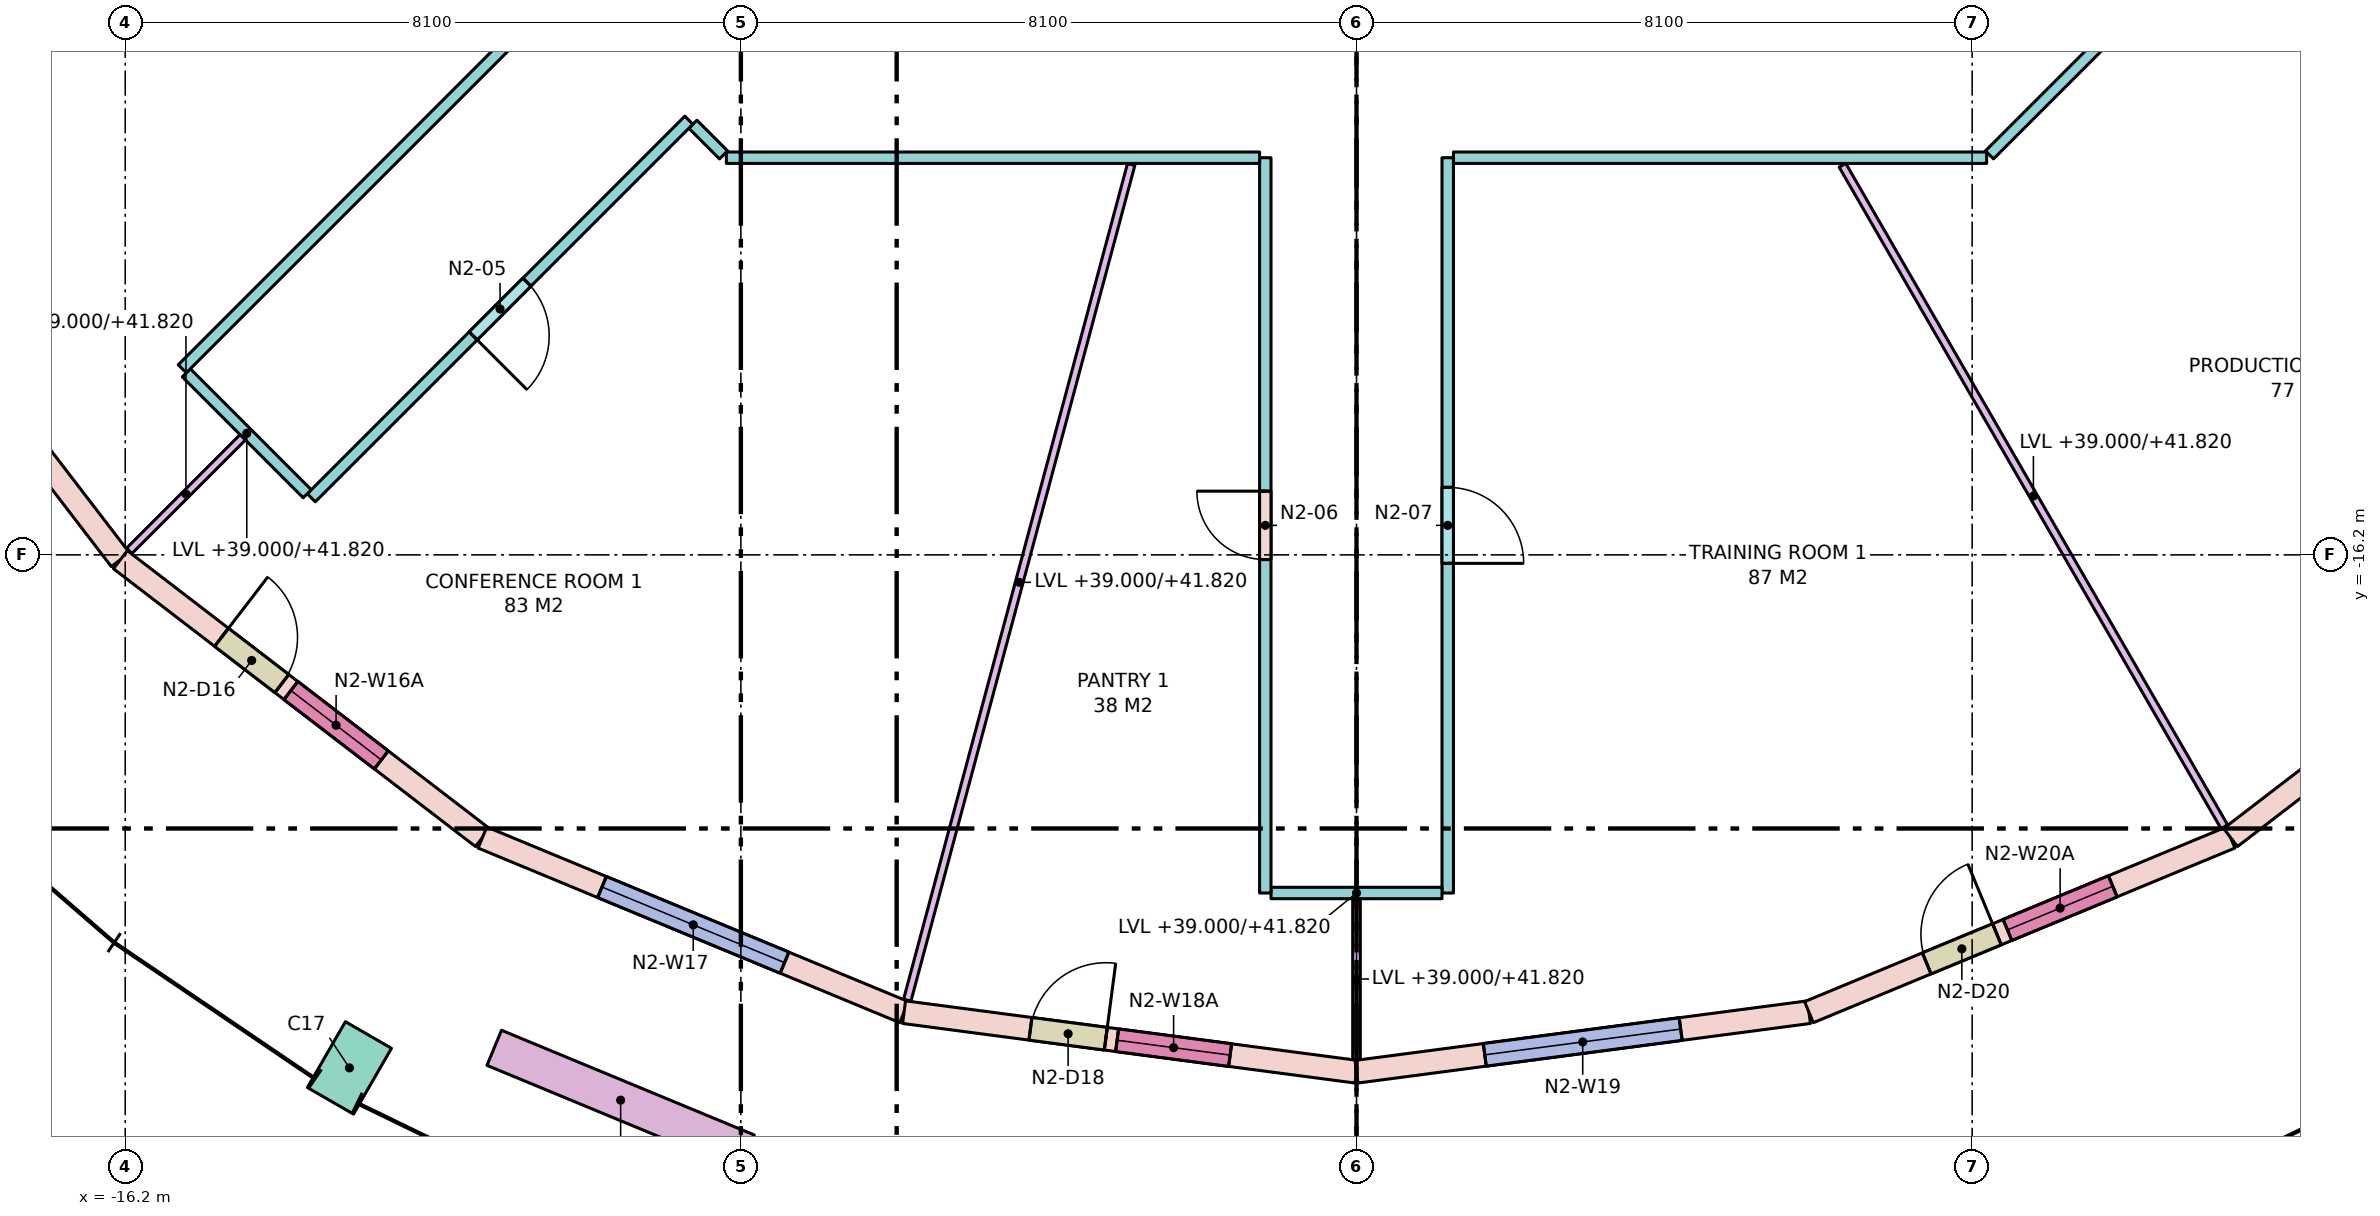
"""IFC4 building model, lengths in metres.
Left out: names, types, materials, properties, quantities, classifications, styles, units other than length and angle.
Written with IfcOpenShell. Run it as: python <this file> out.ifc"""

import sys

from ifc_helpers import new_model, si_unit, direction, frame, frame_2d, origin, origin_2d, place, context, subcontext, project, spatial, rectangle, extrude, element, fill, save


model = new_model("IFC4")
c1 = context("Model", 3, precision=1e-05, world=origin(), true_north=direction((0.0, 1.0)))
c2 = subcontext(c1, "Body", "Model", "MODEL_VIEW")
j1 = project(units=[si_unit("LENGTHUNIT", "METRE"), si_unit("PLANEANGLEUNIT", "RADIAN")], contexts=[c1])
p1 = place(None, origin())
s1 = spatial("IfcSite", under=j1, at=p1, CompositionType="ELEMENT")
p2 = place(p1, origin())
s2 = spatial("IfcBuilding", under=s1, at=p2, CompositionType="ELEMENT")
p3 = place(p2, frame((0.0, 0.0, 39.0)))
s3 = spatial("IfcBuildingStorey", under=s2, at=p3, CompositionType="ELEMENT", Elevation=39.0)
p4 = place(p3, frame((-13.25, -22.95, 0.0), z_axis=(0.0, 0.0, 1.0), x_axis=(0.866025403784, -0.5, 0.0)))
e1 = element("IfcColumn", 1, at=p4, inside=s3, PredefinedType="COLUMN", context=c2, shape_type="SweptSolid", body=[
    extrude(rectangle(XDim=0.7, YDim=1.0, at=origin_2d()), origin(), (0.0, 0.0, 1.0), 4.0),
])
p5 = place(p3, frame((-19.919, -11.5, 0.0), z_axis=(0.0, 0.0, 1.0), x_axis=(0.608778912074, -0.793339924758, 0.0)))
e2 = element("IfcWall", 2, at=p5, inside=s3, PredefinedType="STANDARD", context=c2, shape_type="SweptSolid", body=[
    extrude(rectangle(XDim=6.004, YDim=0.3, at=frame_2d((3.002, 0.0))), origin(), (0.0, 0.0, 1.0), 3.72),
])
p6 = place(p5, frame((1.702, 0.0, 0.8)))
e3 = element("IfcOpeningElement", 3, at=p6, cuts=e2, PredefinedType="OPENING", context=c2, shape_type="SweptSolid", body=[
    extrude(rectangle(XDim=2.6, YDim=2.7, at=frame_2d((1.3, 1.35))), frame((0.0, 0.16, 0.0), z_axis=(0.0, -1.0, 0.0), x_axis=(1.0, 0.0, 0.0)), (0.0, 0.0, 1.0), 0.32),
])
p7 = place(p3, frame((-16.263, -16.263, 0.0), z_axis=(0.0, 0.0, 1.0), x_axis=(0.793339924758, -0.608778912074, 0.0)))
e4 = element("IfcWall", 4, at=p7, inside=s3, PredefinedType="STANDARD", context=c2, shape_type="SweptSolid", body=[
    extrude(rectangle(XDim=6.004, YDim=0.3, at=frame_2d((3.002, 0.0))), origin(), (0.0, 0.0, 1.0), 3.72),
])
p8 = place(p7, frame((1.677, 0.0, 0.0)))
e5 = element("IfcOpeningElement", 5, at=p8, cuts=e4, PredefinedType="OPENING", context=c2, shape_type="SweptSolid", body=[
    extrude(rectangle(XDim=1.0, YDim=2.4, at=frame_2d((0.5, 1.2))), frame((0.0, 0.16, 0.0), z_axis=(0.0, -1.0, 0.0), x_axis=(1.0, 0.0, 0.0)), (0.0, 0.0, 1.0), 0.32),
])
p9 = place(p7, frame((2.827, 0.0, 0.8)))
e6 = element("IfcOpeningElement", 6, at=p9, cuts=e4, PredefinedType="OPENING", context=c2, shape_type="SweptSolid", body=[
    extrude(rectangle(XDim=1.5, YDim=2.7, at=frame_2d((0.75, 1.35))), frame((0.0, 0.16, 0.0), z_axis=(0.0, -1.0, 0.0), x_axis=(1.0, 0.0, 0.0)), (0.0, 0.0, 1.0), 0.32),
])
p10 = place(p3, frame((-11.5, -19.919, 0.0), z_axis=(0.0, 0.0, 1.0), x_axis=(0.923884511653, -0.382671411433, 0.0)))
e7 = element("IfcWall", 7, at=p10, inside=s3, PredefinedType="STANDARD", context=c2, shape_type="SweptSolid", body=[
    extrude(rectangle(XDim=6.004, YDim=0.3, at=frame_2d((3.002, 0.0))), origin(), (0.0, 0.0, 1.0), 3.72),
])
p11 = place(p10, frame((1.702, 0.0, 0.8)))
e8 = element("IfcOpeningElement", 8, at=p11, cuts=e7, PredefinedType="OPENING", context=c2, shape_type="SweptSolid", body=[
    extrude(rectangle(XDim=2.6, YDim=2.7, at=frame_2d((1.3, 1.35))), frame((0.0, 0.16, 0.0), z_axis=(0.0, -1.0, 0.0), x_axis=(1.0, 0.0, 0.0)), (0.0, 0.0, 1.0), 0.32),
])
p12 = place(p3, frame((-5.953, -22.216, 0.0), z_axis=(0.0, 0.0, 1.0), x_axis=(0.991445297315, -0.130522880875, 0.0)))
e9 = element("IfcWall", 9, at=p12, inside=s3, PredefinedType="STANDARD", context=c2, shape_type="SweptSolid", body=[
    extrude(rectangle(XDim=6.004, YDim=0.3, at=frame_2d((3.002, 0.0))), origin(), (0.0, 0.0, 1.0), 3.72),
])
p13 = place(p12, frame((1.677, 0.0, 0.0)))
e10 = element("IfcOpeningElement", 10, at=p13, cuts=e9, PredefinedType="OPENING", context=c2, shape_type="SweptSolid", body=[
    extrude(rectangle(XDim=1.0, YDim=2.4, at=frame_2d((0.5, 1.2))), frame((0.0, 0.16, 0.0), z_axis=(0.0, -1.0, 0.0), x_axis=(1.0, 0.0, 0.0)), (0.0, 0.0, 1.0), 0.32),
])
p14 = place(p12, frame((2.827, 0.0, 0.8)))
e11 = element("IfcOpeningElement", 11, at=p14, cuts=e9, PredefinedType="OPENING", context=c2, shape_type="SweptSolid", body=[
    extrude(rectangle(XDim=1.5, YDim=2.7, at=frame_2d((0.75, 1.35))), frame((0.0, 0.16, 0.0), z_axis=(0.0, -1.0, 0.0), x_axis=(1.0, 0.0, 0.0)), (0.0, 0.0, 1.0), 0.32),
])
p15 = place(p3, frame((0.0, -23.0, 0.0), z_axis=(0.0, 0.0, 1.0), x_axis=(0.991445297315, 0.130522880875, 0.0)))
e12 = element("IfcWall", 12, at=p15, inside=s3, PredefinedType="STANDARD", context=c2, shape_type="SweptSolid", body=[
    extrude(rectangle(XDim=6.004, YDim=0.3, at=frame_2d((3.002, 0.0))), origin(), (0.0, 0.0, 1.0), 3.72),
])
p16 = place(p15, frame((1.702, 0.0, 0.8)))
e13 = element("IfcOpeningElement", 13, at=p16, cuts=e12, PredefinedType="OPENING", context=c2, shape_type="SweptSolid", body=[
    extrude(rectangle(XDim=2.6, YDim=2.7, at=frame_2d((1.3, 1.35))), frame((0.0, 0.16, 0.0), z_axis=(0.0, -1.0, 0.0), x_axis=(1.0, 0.0, 0.0)), (0.0, 0.0, 1.0), 0.32),
])
p17 = place(p3, frame((5.953, -22.216, 0.0), z_axis=(0.0, 0.0, 1.0), x_axis=(0.923884511653, 0.382671411433, 0.0)))
e14 = element("IfcWall", 14, at=p17, inside=s3, PredefinedType="STANDARD", context=c2, shape_type="SweptSolid", body=[
    extrude(rectangle(XDim=6.004, YDim=0.3, at=frame_2d((3.002, 0.0))), origin(), (0.0, 0.0, 1.0), 3.72),
])
p18 = place(p17, frame((1.677, 0.0, 0.0)))
e15 = element("IfcOpeningElement", 15, at=p18, cuts=e14, PredefinedType="OPENING", context=c2, shape_type="SweptSolid", body=[
    extrude(rectangle(XDim=1.0, YDim=2.4, at=frame_2d((0.5, 1.2))), frame((0.0, 0.16, 0.0), z_axis=(0.0, -1.0, 0.0), x_axis=(1.0, 0.0, 0.0)), (0.0, 0.0, 1.0), 0.32),
])
p19 = place(p17, frame((2.827, 0.0, 0.8)))
e16 = element("IfcOpeningElement", 16, at=p19, cuts=e14, PredefinedType="OPENING", context=c2, shape_type="SweptSolid", body=[
    extrude(rectangle(XDim=1.5, YDim=2.7, at=frame_2d((0.75, 1.35))), frame((0.0, 0.16, 0.0), z_axis=(0.0, -1.0, 0.0), x_axis=(1.0, 0.0, 0.0)), (0.0, 0.0, 1.0), 0.32),
])
p20 = place(p3, frame((11.5, -19.919, 0.0), z_axis=(0.0, 0.0, 1.0), x_axis=(0.793339924758, 0.608778912074, 0.0)))
e17 = element("IfcWall", 17, at=p20, inside=s3, PredefinedType="STANDARD", context=c2, shape_type="SweptSolid", body=[
    extrude(rectangle(XDim=6.004, YDim=0.3, at=frame_2d((3.002, 0.0))), origin(), (0.0, 0.0, 1.0), 3.72),
])
p21 = place(p20, frame((1.702, 0.0, 0.8)))
e18 = element("IfcOpeningElement", 18, at=p21, cuts=e17, PredefinedType="OPENING", context=c2, shape_type="SweptSolid", body=[
    extrude(rectangle(XDim=2.6, YDim=2.7, at=frame_2d((1.3, 1.35))), frame((0.0, 0.16, 0.0), z_axis=(0.0, -1.0, 0.0), x_axis=(1.0, 0.0, 0.0)), (0.0, 0.0, 1.0), 0.32),
])
p22 = place(p3, frame((-11.345, -22.685, 0.0), z_axis=(0.0, 0.0, 1.0), x_axis=(0.923885420167, -0.382669217998, 0.0)))
e19 = element("IfcWall", 19, at=p22, inside=s3, PredefinedType="PARAPET", context=c2, shape_type="SweptSolid", body=[
    extrude(rectangle(XDim=3.6, YDim=0.5, at=frame_2d((1.8, 0.0))), origin(), (0.0, 0.0, 1.0), 0.9),
])
p23 = place(p3, frame((17.282, -11.364, 0.0), z_axis=(0.0, 0.0, 1.0), x_axis=(-0.86603341746, 0.49998611965, 0.0)))
e20 = element("IfcWall", 20, at=p23, inside=s3, PredefinedType="PARTITIONING", context=c2, shape_type="SweptSolid", body=[
    extrude(rectangle(XDim=6.866, YDim=0.15, at=frame_2d((3.433, 0.0))), origin(), (0.0, 0.0, 1.0), 3.72),
])
p24 = place(p23, frame((2.983, 0.0, 0.0)))
e21 = element("IfcOpeningElement", 21, at=p24, cuts=e20, PredefinedType="OPENING", context=c2, shape_type="SweptSolid", body=[
    extrude(rectangle(XDim=0.9, YDim=2.1, at=frame_2d((0.45, 1.05))), frame((0.0, 0.085, 0.0), z_axis=(0.0, -1.0, 0.0), x_axis=(1.0, 0.0, 0.0)), (0.0, 0.0, 1.0), 0.17),
])
p25 = place(p3, frame((11.284, -7.981, 0.0), z_axis=(0.0, 0.0, 1.0), x_axis=(-0.707077584218, -0.707135976949, 0.0)))
e22 = element("IfcWall", 22, at=p25, inside=s3, PredefinedType="PARTITIONING", context=c2, shape_type="SweptSolid", body=[
    extrude(rectangle(XDim=4.181, YDim=0.15, at=frame_2d((2.09, 0.0))), origin(), (0.0, 0.0, 1.0), 2.82),
])
p26 = place(p3, frame((8.291, -10.975, 0.0), z_axis=(0.0, 0.0, 1.0), x_axis=(-1.0, 0.0, 0.0)))
e23 = element("IfcWall", 23, at=p26, inside=s3, PredefinedType="PARTITIONING", context=c2, shape_type="SweptSolid", body=[
    extrude(rectangle(XDim=7.016, YDim=0.15, at=frame_2d((3.508, 0.0))), origin(), (0.0, 0.0, 1.0), 2.82),
])
p27 = place(p3, frame((1.2, -10.975, 0.0), z_axis=(0.0, 0.0, 1.0), x_axis=(0.0, -1.0, 0.0)))
e24 = element("IfcWall", 24, at=p27, inside=s3, PredefinedType="PARTITIONING", context=c2, shape_type="SweptSolid", body=[
    extrude(rectangle(XDim=9.674, YDim=0.15, at=frame_2d((4.837, 0.0))), origin(), (0.0, 0.0, 1.0), 3.72),
])
p28 = place(p27, frame((4.337, 0.0, 0.0)))
e25 = element("IfcOpeningElement", 25, at=p28, cuts=e24, PredefinedType="OPENING", context=c2, shape_type="SweptSolid", body=[
    extrude(rectangle(XDim=1.0, YDim=2.1, at=frame_2d((0.5, 1.05))), frame((0.0, 0.085, 0.0), z_axis=(0.0, -1.0, 0.0), x_axis=(1.0, 0.0, 0.0)), (0.0, 0.0, 1.0), 0.17),
])
p29 = place(p3, frame((1.125, -20.649, 0.0), z_axis=(0.0, 0.0, 1.0), x_axis=(-1.0, 0.0, 0.0)))
e26 = element("IfcWall", 26, at=p29, inside=s3, PredefinedType="PARTITIONING", context=c2, shape_type="SweptSolid", body=[
    extrude(rectangle(XDim=2.25, YDim=0.15, at=frame_2d((1.125, 0.0))), origin(), (0.0, 0.0, 1.0), 2.82),
])
p30 = place(p3, frame((-1.2, -20.649, 0.0), z_axis=(0.0, 0.0, 1.0), x_axis=(0.0, 1.0, 0.0)))
e27 = element("IfcWall", 27, at=p30, inside=s3, PredefinedType="PARTITIONING", context=c2, shape_type="SweptSolid", body=[
    extrude(rectangle(XDim=9.674, YDim=0.15, at=frame_2d((4.837, 0.0))), origin(), (0.0, 0.0, 1.0), 3.72),
])
p31 = place(p30, frame((4.387, 0.0, 0.0)))
e28 = element("IfcOpeningElement", 28, at=p31, cuts=e27, PredefinedType="OPENING", context=c2, shape_type="SweptSolid", body=[
    extrude(rectangle(XDim=0.9, YDim=2.1, at=frame_2d((0.45, 1.05))), frame((0.0, 0.085, 0.0), z_axis=(0.0, -1.0, 0.0), x_axis=(1.0, 0.0, 0.0)), (0.0, 0.0, 1.0), 0.17),
])
p32 = place(p3, frame((-1.275, -10.975, 0.0), z_axis=(0.0, 0.0, 1.0), x_axis=(-1.0, 0.0, 0.0)))
e29 = element("IfcWall", 29, at=p32, inside=s3, PredefinedType="PARTITIONING", context=c2, shape_type="SweptSolid", body=[
    extrude(rectangle(XDim=7.016, YDim=0.15, at=frame_2d((3.508, 0.0))), origin(), (0.0, 0.0, 1.0), 2.82),
])
p33 = place(p3, frame((-8.328, -10.938, 0.0), z_axis=(0.0, 0.0, 1.0), x_axis=(-0.707106781187, 0.707106781187, 0.0)))
e30 = element("IfcWall", 30, at=p33, inside=s3, PredefinedType="PARTITIONING", context=c2, shape_type="SweptSolid", body=[
    extrude(rectangle(XDim=0.571, YDim=0.15, at=frame_2d((0.285, 0.0))), origin(), (0.0, 0.0, 1.0), 3.72),
])
p34 = place(p3, frame((-8.784, -10.481, 0.0), z_axis=(0.0, 0.0, 1.0), x_axis=(-0.707089406061, -0.707124155885, 0.0)))
e31 = element("IfcWall", 31, at=p34, inside=s3, PredefinedType="PARTITIONING", context=c2, shape_type="SweptSolid", body=[
    extrude(rectangle(XDim=7.026, YDim=0.15, at=frame_2d((3.513, 0.0))), origin(), (0.0, 0.0, 1.0), 3.72),
])
p35 = place(p34, frame((3.013, 0.0, 0.0)))
e32 = element("IfcOpeningElement", 32, at=p35, cuts=e31, PredefinedType="OPENING", context=c2, shape_type="SweptSolid", body=[
    extrude(rectangle(XDim=1.0, YDim=2.1, at=frame_2d((0.5, 1.05))), frame((0.0, 0.085, 0.0), z_axis=(0.0, -1.0, 0.0), x_axis=(1.0, 0.0, 0.0)), (0.0, 0.0, 1.0), 0.17),
])
p36 = place(p3, frame((-13.805, -15.396, 0.0), z_axis=(0.0, 0.0, 1.0), x_axis=(-0.707106781187, 0.707106781187, 0.0)))
e33 = element("IfcWall", 33, at=p36, inside=s3, PredefinedType="PARTITIONING", context=c2, shape_type="SweptSolid", body=[
    extrude(rectangle(XDim=2.25, YDim=0.15, at=frame_2d((1.125, 0.0))), origin(), (0.0, 0.0, 1.0), 2.82),
])
p37 = place(p3, frame((-15.449, -13.752, 0.0), z_axis=(0.0, 0.0, 1.0), x_axis=(0.707124155885, 0.707089406061, 0.0)))
e34 = element("IfcWall", 34, at=p37, inside=s3, PredefinedType="PARTITIONING", context=c2, shape_type="SweptSolid", body=[
    extrude(rectangle(XDim=7.026, YDim=0.15, at=frame_2d((3.513, 0.0))), origin(), (0.0, 0.0, 1.0), 3.72),
])
p38 = place(p3, frame((-14.654, -14.654, 0.0), z_axis=(0.0, 0.0, 1.0), x_axis=(-0.707106781187, -0.707106781187, 0.0)))
e35 = element("IfcWall", 35, at=p38, inside=s3, PredefinedType="PARTITIONING", context=c2, shape_type="SweptSolid", body=[
    extrude(rectangle(XDim=2.113, YDim=0.1, at=frame_2d((1.057, 0.0))), origin(), (0.0, 0.0, 1.0), 2.82),
])
p39 = place(p3, frame((-2.965, -11.064, 0.0), z_axis=(0.0, 0.0, 1.0), x_axis=(-0.258827930947, -0.965923445291, 0.0)))
e36 = element("IfcWall", 36, at=p39, inside=s3, PredefinedType="PARTITIONING", context=c2, shape_type="SweptSolid", body=[
    extrude(rectangle(XDim=11.382, YDim=0.1, at=frame_2d((5.691, 0.0))), origin(), (0.0, 0.0, 1.0), 2.82),
])
p40 = place(p3, frame((0.0, -20.724, 0.0), z_axis=(0.0, 0.0, 1.0), x_axis=(0.0, -1.0, 0.0)))
e37 = element("IfcWall", 37, at=p40, inside=s3, PredefinedType="PARTITIONING", context=c2, shape_type="SweptSolid", body=[
    extrude(rectangle(XDim=2.113, YDim=0.1, at=frame_2d((1.057, 0.0))), origin(), (0.0, 0.0, 1.0), 2.82),
])
p41 = place(p3, frame((6.394, -11.075, 0.0), z_axis=(0.0, 0.0, 1.0), x_axis=(0.500024592647, -0.866011204747, 0.0)))
e38 = element("IfcWall", 38, at=p41, inside=s3, PredefinedType="PARTITIONING", context=c2, shape_type="SweptSolid", body=[
    extrude(rectangle(XDim=10.049, YDim=0.1, at=frame_2d((5.024, 0.0))), origin(), (0.0, 0.0, 1.0), 2.82),
])
p42 = place(p8, origin())
e39 = element("IfcDoor", 39, at=p42, inside=s3, OperationType="SINGLE_SWING_LEFT", PredefinedType="DOOR", context=c2, shape_type="SweptSolid", body=[
    extrude(rectangle(XDim=1.0, YDim=2.4, at=frame_2d((0.5, 1.2))), frame((0.0, 0.025, 0.0), z_axis=(0.0, -1.0, 0.0), x_axis=(1.0, 0.0, 0.0)), (0.0, 0.0, 1.0), 0.05),
])
fill(e5, e39)
p43 = place(p9, origin())
e40 = element("IfcWindow", 40, at=p43, inside=s3, PartitioningType="SINGLE_PANEL", PredefinedType="WINDOW", context=c2, shape_type="SweptSolid", body=[
    extrude(rectangle(XDim=1.5, YDim=2.7, at=frame_2d((0.75, 1.35))), frame((0.0, 0.03, 0.0), z_axis=(0.0, -1.0, 0.0), x_axis=(1.0, 0.0, 0.0)), (0.0, 0.0, 1.0), 0.06),
])
fill(e6, e40)
p44 = place(p11, origin())
e41 = element("IfcWindow", 41, at=p44, inside=s3, PartitioningType="SINGLE_PANEL", PredefinedType="WINDOW", context=c2, shape_type="SweptSolid", body=[
    extrude(rectangle(XDim=2.6, YDim=2.7, at=frame_2d((1.3, 1.35))), frame((0.0, 0.03, 0.0), z_axis=(0.0, -1.0, 0.0), x_axis=(1.0, 0.0, 0.0)), (0.0, 0.0, 1.0), 0.06),
])
fill(e8, e41)
p45 = place(p13, origin())
e42 = element("IfcDoor", 42, at=p45, inside=s3, OperationType="SINGLE_SWING_RIGHT", PredefinedType="DOOR", context=c2, shape_type="SweptSolid", body=[
    extrude(rectangle(XDim=1.0, YDim=2.4, at=frame_2d((0.5, 1.2))), frame((0.0, 0.025, 0.0), z_axis=(0.0, -1.0, 0.0), x_axis=(1.0, 0.0, 0.0)), (0.0, 0.0, 1.0), 0.05),
])
fill(e10, e42)
p46 = place(p14, origin())
e43 = element("IfcWindow", 43, at=p46, inside=s3, PartitioningType="SINGLE_PANEL", PredefinedType="WINDOW", context=c2, shape_type="SweptSolid", body=[
    extrude(rectangle(XDim=1.5, YDim=2.7, at=frame_2d((0.75, 1.35))), frame((0.0, 0.03, 0.0), z_axis=(0.0, -1.0, 0.0), x_axis=(1.0, 0.0, 0.0)), (0.0, 0.0, 1.0), 0.06),
])
fill(e11, e43)
p47 = place(p16, origin())
e44 = element("IfcWindow", 44, at=p47, inside=s3, PartitioningType="SINGLE_PANEL", PredefinedType="WINDOW", context=c2, shape_type="SweptSolid", body=[
    extrude(rectangle(XDim=2.6, YDim=2.7, at=frame_2d((1.3, 1.35))), frame((0.0, 0.03, 0.0), z_axis=(0.0, -1.0, 0.0), x_axis=(1.0, 0.0, 0.0)), (0.0, 0.0, 1.0), 0.06),
])
fill(e13, e44)
p48 = place(p18, origin())
e45 = element("IfcDoor", 45, at=p48, inside=s3, OperationType="SINGLE_SWING_RIGHT", PredefinedType="DOOR", context=c2, shape_type="SweptSolid", body=[
    extrude(rectangle(XDim=1.0, YDim=2.4, at=frame_2d((0.5, 1.2))), frame((0.0, 0.025, 0.0), z_axis=(0.0, -1.0, 0.0), x_axis=(1.0, 0.0, 0.0)), (0.0, 0.0, 1.0), 0.05),
])
fill(e15, e45)
p49 = place(p19, origin())
e46 = element("IfcWindow", 46, at=p49, inside=s3, PartitioningType="SINGLE_PANEL", PredefinedType="WINDOW", context=c2, shape_type="SweptSolid", body=[
    extrude(rectangle(XDim=1.5, YDim=2.7, at=frame_2d((0.75, 1.35))), frame((0.0, 0.03, 0.0), z_axis=(0.0, -1.0, 0.0), x_axis=(1.0, 0.0, 0.0)), (0.0, 0.0, 1.0), 0.06),
])
fill(e16, e46)
p50 = place(p35, origin())
e47 = element("IfcDoor", 47, at=p50, inside=s3, OperationType="SINGLE_SWING_RIGHT", PredefinedType="DOOR", context=c2, shape_type="SweptSolid", body=[
    extrude(rectangle(XDim=1.0, YDim=2.1, at=frame_2d((0.5, 1.05))), frame((0.0, 0.025, 0.0), z_axis=(0.0, -1.0, 0.0), x_axis=(1.0, 0.0, 0.0)), (0.0, 0.0, 1.0), 0.05),
])
fill(e32, e47)
p51 = place(p31, origin())
e48 = element("IfcDoor", 48, at=p51, inside=s3, OperationType="SINGLE_SWING_RIGHT", PredefinedType="DOOR", context=c2, shape_type="SweptSolid", body=[
    extrude(rectangle(XDim=0.9, YDim=2.1, at=frame_2d((0.45, 1.05))), frame((0.0, 0.025, 0.0), z_axis=(0.0, -1.0, 0.0), x_axis=(1.0, 0.0, 0.0)), (0.0, 0.0, 1.0), 0.05),
])
fill(e28, e48)
p52 = place(p28, origin())
e49 = element("IfcDoor", 49, at=p52, inside=s3, OperationType="SINGLE_SWING_RIGHT", PredefinedType="DOOR", context=c2, shape_type="SweptSolid", body=[
    extrude(rectangle(XDim=1.0, YDim=2.1, at=frame_2d((0.5, 1.05))), frame((0.0, 0.025, 0.0), z_axis=(0.0, -1.0, 0.0), x_axis=(1.0, 0.0, 0.0)), (0.0, 0.0, 1.0), 0.05),
])
fill(e25, e49)
save(model, sys.argv[1])
